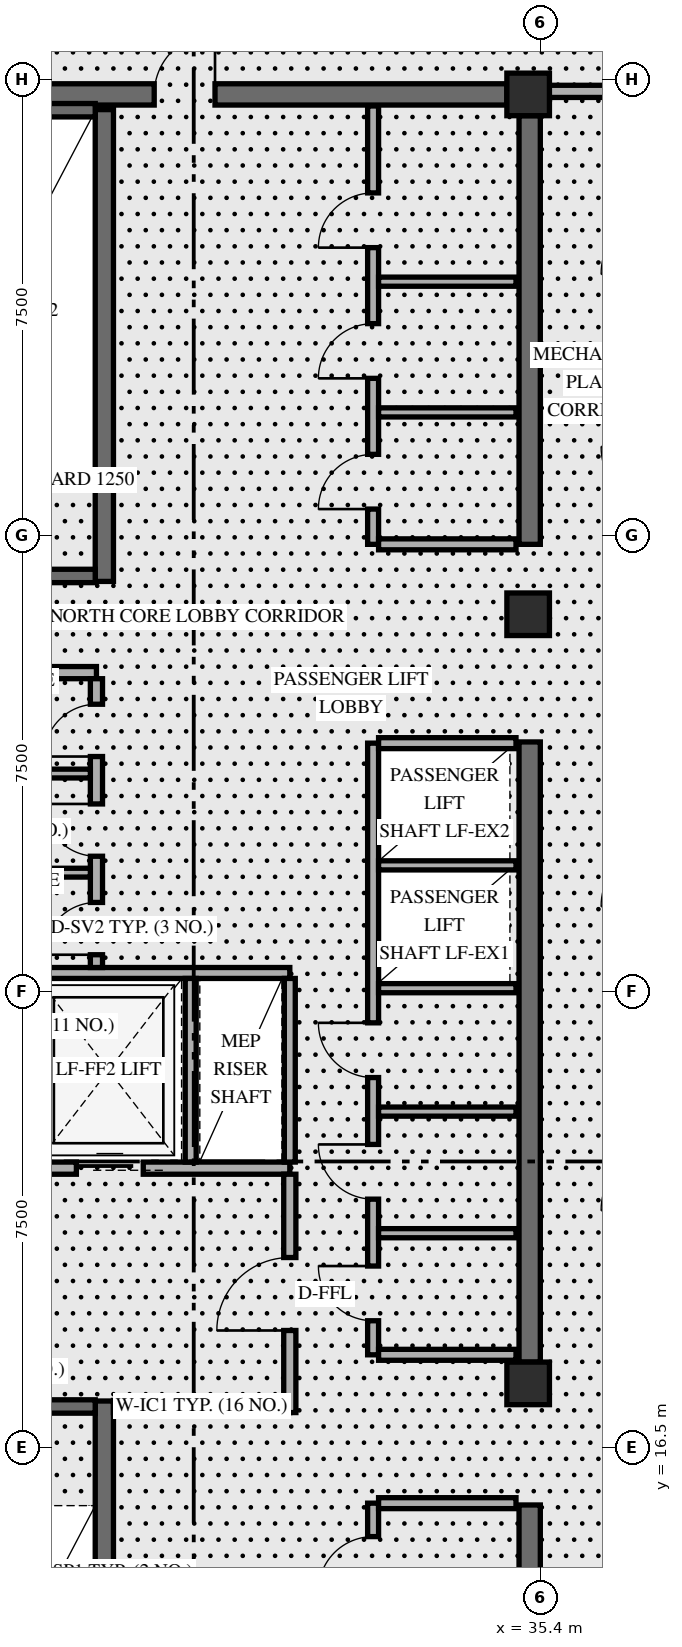
"""IFC4 building model, lengths in metres.
Left out: names, types, materials, properties, quantities, classifications, styles, units other than length and angle.
Written with IfcOpenShell. Run it as: python <this file> out.ifc"""

import sys

from ifc_helpers import new_model, si_unit, direction, frame, frame_2d, origin, origin_2d, place, context, subcontext, project, spatial, rectangle, extrude, element, fill, save


model = new_model("IFC4")
c1 = context("Model", 3, precision=1e-05, world=origin(), true_north=direction((0.0, 1.0)))
c2 = subcontext(c1, "Body", "Model", "MODEL_VIEW")
j1 = project(units=[si_unit("LENGTHUNIT", "METRE"), si_unit("PLANEANGLEUNIT", "RADIAN")], contexts=[c1])
p1 = place(None, origin())
s1 = spatial("IfcSite", under=j1, at=p1, CompositionType="ELEMENT")
p2 = place(p1, origin())
s2 = spatial("IfcBuilding", under=s1, at=p2, CompositionType="ELEMENT")
p3 = place(p2, frame((0.0, 0.0, 287.0)))
s3 = spatial("IfcBuildingStorey", under=s2, at=p3, CompositionType="ELEMENT", Elevation=287.0)
p4 = place(p3, frame((35.225, 9.6, 0.0), z_axis=(0.0, 0.0, 1.0), x_axis=(0.0, 1.0, 0.0)))
e1 = element("IfcWall", 1, at=p4, inside=s3, PredefinedType="SHEAR", context=c2, shape_type="SweptSolid", body=[
    extrude(rectangle(XDim=5.95, YDim=0.35, at=frame_2d((2.975, 0.0))), origin(), (0.0, 0.0, 1.0), 5.161),
])
p5 = place(p3, frame((35.225, 17.9, 0.0), z_axis=(0.0, 0.0, 1.0), x_axis=(0.0, 1.0, 0.0)))
e2 = element("IfcWall", 2, at=p5, inside=s3, PredefinedType="SHEAR", context=c2, shape_type="SweptSolid", body=[
    extrude(rectangle(XDim=10.2, YDim=0.35, at=frame_2d((5.1, 0.0))), origin(), (0.0, 0.0, 1.0), 5.161),
])
p6 = place(p3, frame((35.225, 31.35, 0.0), z_axis=(0.0, 0.0, 1.0), x_axis=(0.0, 1.0, 0.0)))
e3 = element("IfcWall", 3, at=p6, inside=s3, PredefinedType="SHEAR", context=c2, shape_type="SweptSolid", body=[
    extrude(rectangle(XDim=7.05, YDim=0.35, at=frame_2d((3.525, 0.0))), origin(), (0.0, 0.0, 1.0), 5.161),
])
p7 = place(p3, frame((24.55, 38.75, 0.0), z_axis=(0.0, 0.0, 1.0), x_axis=(1.0, 0.0, 0.0)))
e4 = element("IfcWall", 4, at=p7, inside=s3, PredefinedType="SHEAR", context=c2, shape_type="SweptSolid", body=[
    extrude(rectangle(XDim=10.3, YDim=0.35, at=frame_2d((5.15, 0.0))), origin(), (0.0, 0.0, 1.0), 5.7),
])
p8 = place(p7, frame((4.5, 0.0, 0.0)))
e5 = element("IfcOpeningElement", 5, at=p8, cuts=e4, PredefinedType="OPENING", context=c2, shape_type="SweptSolid", body=[
    extrude(rectangle(XDim=1.0, YDim=2.15, at=frame_2d((0.5, 1.075))), frame((0.0, 0.185, 0.0), z_axis=(0.0, -1.0, 0.0), x_axis=(1.0, 0.0, 0.0)), (0.0, 0.0, 1.0), 0.37),
])
p9 = place(p3, frame((28.23, 9.5, 0.0), z_axis=(0.0, 0.0, 1.0), x_axis=(0.0, 1.0, 0.0)))
e6 = element("IfcWall", 6, at=p9, inside=s3, PredefinedType="SHEAR", context=c2, shape_type="SweptSolid", body=[
    extrude(rectangle(XDim=7.76, YDim=0.3, at=frame_2d((3.88, 0.0))), origin(), (0.0, 0.0, 1.0), 5.7),
])
p10 = place(p3, frame((24.92, 17.17, 0.0), z_axis=(0.0, 0.0, 1.0), x_axis=(1.0, 0.0, 0.0)))
e7 = element("IfcWall", 7, at=p10, inside=s3, PredefinedType="SHEAR", context=c2, shape_type="SweptSolid", body=[
    extrude(rectangle(XDim=3.16, YDim=0.22, at=frame_2d((1.58, 0.0))), origin(), (0.0, 0.0, 1.0), 5.7),
])
p11 = place(p10, frame((0.78, 0.0, 0.0)))
e8 = element("IfcOpeningElement", 8, at=p11, cuts=e7, PredefinedType="OPENING", context=c2, shape_type="SweptSolid", body=[
    extrude(rectangle(XDim=1.05, YDim=2.15, at=frame_2d((0.525, 1.075))), frame((0.0, 0.12, 0.0), z_axis=(0.0, -1.0, 0.0), x_axis=(1.0, 0.0, 0.0)), (0.0, 0.0, 1.0), 0.24),
])
p12 = place(p3, frame((28.23, 30.74, 0.0), z_axis=(0.0, 0.0, 1.0), x_axis=(0.0, 1.0, 0.0)))
e9 = element("IfcWall", 9, at=p12, inside=s3, PredefinedType="SHEAR", context=c2, shape_type="SweptSolid", body=[
    extrude(rectangle(XDim=7.76, YDim=0.3, at=frame_2d((3.88, 0.0))), origin(), (0.0, 0.0, 1.0), 5.7),
])
p13 = place(p3, frame((24.92, 30.83, 0.0), z_axis=(0.0, 0.0, 1.0), x_axis=(1.0, 0.0, 0.0)))
e10 = element("IfcWall", 10, at=p13, inside=s3, PredefinedType="SHEAR", context=c2, shape_type="SweptSolid", body=[
    extrude(rectangle(XDim=3.16, YDim=0.22, at=frame_2d((1.58, 0.0))), origin(), (0.0, 0.0, 1.0), 5.7),
])
p14 = place(p13, frame((0.78, 0.0, 0.0)))
e11 = element("IfcOpeningElement", 11, at=p14, cuts=e10, PredefinedType="OPENING", context=c2, shape_type="SweptSolid", body=[
    extrude(rectangle(XDim=1.05, YDim=2.15, at=frame_2d((0.525, 1.075))), frame((0.0, 0.12, 0.0), z_axis=(0.0, -1.0, 0.0), x_axis=(1.0, 0.0, 0.0)), (0.0, 0.0, 1.0), 0.24),
])
p15 = place(p3, frame((24.92, 38.49, 0.0), z_axis=(0.0, 0.0, 1.0), x_axis=(1.0, 0.0, 0.0)))
e12 = element("IfcWall", 12, at=p15, inside=s3, PredefinedType="SHEAR", context=c2, shape_type="SweptSolid", body=[
    extrude(rectangle(XDim=3.16, YDim=0.22, at=frame_2d((1.58, 0.0))), origin(), (0.0, 0.0, 1.0), 5.7),
])
for number, where, z_axis, x_axis in (
    (13, (35.2, 17.55, 0.0), (0.0, 0.0, 1.0), (1.0, 0.0, 0.0)),
    (14, (35.2, 30.2, 0.0), (0.0, 0.0, 1.0), (1.0, 0.0, 0.0)),
    (15, (35.2, 38.75, 0.0), (0.0, 0.0, 1.0), (1.0, 0.0, 0.0)),
):
    element("IfcColumn", number, at=place(p3, frame(where, z_axis=z_axis, x_axis=x_axis)), inside=s3, PredefinedType="COLUMN", context=c2, shape_type="SweptSolid", body=[
        extrude(rectangle(XDim=0.7, YDim=0.7, at=origin_2d()), origin(), (0.0, 0.0, 1.0), 5.996),
    ])
p16 = place(p3, frame((24.45, 21.09, 0.0), z_axis=(0.0, 0.0, 1.0), x_axis=(1.0, 0.0, 0.0)))
e16 = element("IfcWall", 16, at=p16, inside=s3, PredefinedType="STANDARD", context=c2, shape_type="SweptSolid", body=[
    extrude(rectangle(XDim=6.83, YDim=0.2, at=frame_2d((3.415, 0.0))), origin(), (0.0, 0.0, 1.0), 5.7),
])
p17 = place(p16, frame((0.72, 0.0, 0.0)))
e17 = element("IfcOpeningElement", 17, at=p17, cuts=e16, PredefinedType="OPENING", context=c2, shape_type="SweptSolid", body=[
    extrude(rectangle(XDim=1.1, YDim=2.2, at=frame_2d((0.55, 1.1))), frame((0.0, 0.11, 0.0), z_axis=(0.0, -1.0, 0.0), x_axis=(1.0, 0.0, 0.0)), (0.0, 0.0, 1.0), 0.22),
])
p18 = place(p16, frame((3.32, 0.0, 0.0)))
e18 = element("IfcOpeningElement", 18, at=p18, cuts=e16, PredefinedType="OPENING", context=c2, shape_type="SweptSolid", body=[
    extrude(rectangle(XDim=1.1, YDim=2.2, at=frame_2d((0.55, 1.1))), frame((0.0, 0.11, 0.0), z_axis=(0.0, -1.0, 0.0), x_axis=(1.0, 0.0, 0.0)), (0.0, 0.0, 1.0), 0.22),
])
p19 = place(p3, frame((28.38, 17.17, 0.0), z_axis=(0.0, 0.0, 1.0), x_axis=(1.0, 0.0, 0.0)))
e19 = element("IfcWall", 19, at=p19, inside=s3, PredefinedType="STANDARD", context=c2, shape_type="SweptSolid", body=[
    extrude(rectangle(XDim=2.9, YDim=0.2, at=frame_2d((1.45, 0.0))), origin(), (0.0, 0.0, 1.0), 5.7),
])
p20 = place(p3, frame((31.28, 17.07, 0.0), z_axis=(0.0, 0.0, 1.0), x_axis=(0.0, 1.0, 0.0)))
e20 = element("IfcWall", 20, at=p20, inside=s3, PredefinedType="STANDARD", context=c2, shape_type="SweptSolid", body=[
    extrude(rectangle(XDim=3.92, YDim=0.2, at=frame_2d((1.96, 0.0))), origin(), (0.0, 0.0, 1.0), 5.143),
])
p21 = place(p20, frame((1.35, 0.0, 0.0)))
e21 = element("IfcOpeningElement", 21, at=p21, cuts=e20, PredefinedType="OPENING", context=c2, shape_type="SweptSolid", body=[
    extrude(rectangle(XDim=1.2, YDim=2.15, at=frame_2d((0.6, 1.075))), frame((0.0, 0.11, 0.0), z_axis=(0.0, -1.0, 0.0), x_axis=(1.0, 0.0, 0.0)), (0.0, 0.0, 1.0), 0.22),
])
p22 = place(p3, frame((24.45, 24.3, 0.0), z_axis=(0.0, 0.0, 1.0), x_axis=(1.0, 0.0, 0.0)))
e22 = element("IfcWall", 22, at=p22, inside=s3, PredefinedType="STANDARD", context=c2, shape_type="SweptSolid", body=[
    extrude(rectangle(XDim=6.83, YDim=0.18, at=frame_2d((3.415, 0.0))), origin(), (0.0, 0.0, 1.0), 5.7),
])
for number, where, z_axis, x_axis in (
    (23, (29.65, 21.19, 0.0), (0.0, 0.0, 1.0), (0.0, 1.0, 0.0)),
    (24, (31.28, 21.19, 0.0), (0.0, 0.0, 1.0), (0.0, 1.0, 0.0)),
):
    element("IfcWall", number, at=place(p3, frame(where, z_axis=z_axis, x_axis=x_axis)), inside=s3, PredefinedType="STANDARD", context=c2, shape_type="SweptSolid", body=[
        extrude(rectangle(XDim=3.02, YDim=0.18, at=frame_2d((1.51, 0.0))), origin(), (0.0, 0.0, 1.0), 5.7),
    ])
p23 = place(p3, frame((24.45, 29.24, 0.0), z_axis=(0.0, 0.0, 1.0), x_axis=(1.0, 0.0, 0.0)))
e25 = element("IfcWall", 25, at=p23, inside=s3, PredefinedType="STANDARD", context=c2, shape_type="SweptSolid", body=[
    extrude(rectangle(XDim=3.65, YDim=0.2, at=frame_2d((1.825, 0.0))), origin(), (0.0, 0.0, 1.0), 5.7),
])
p24 = place(p3, frame((28.1, 24.39, 0.0), z_axis=(0.0, 0.0, 1.0), x_axis=(0.0, 1.0, 0.0)))
e26 = element("IfcWall", 26, at=p24, inside=s3, PredefinedType="STANDARD", context=c2, shape_type="SweptSolid", body=[
    extrude(rectangle(XDim=4.75, YDim=0.2, at=frame_2d((2.375, 0.0))), origin(), (0.0, 0.0, 1.0), 5.7),
])
p25 = place(p24, frame((0.21, 0.0, 0.0)))
e27 = element("IfcOpeningElement", 27, at=p25, cuts=e26, PredefinedType="OPENING", context=c2, shape_type="SweptSolid", body=[
    extrude(rectangle(XDim=0.86, YDim=2.1, at=frame_2d((0.43, 1.05))), frame((0.0, 0.11, 0.0), z_axis=(0.0, -1.0, 0.0), x_axis=(1.0, 0.0, 0.0)), (0.0, 0.0, 1.0), 0.22),
])
p26 = place(p24, frame((1.83, 0.0, 0.0)))
e28 = element("IfcOpeningElement", 28, at=p26, cuts=e26, PredefinedType="OPENING", context=c2, shape_type="SweptSolid", body=[
    extrude(rectangle(XDim=0.86, YDim=2.1, at=frame_2d((0.43, 1.05))), frame((0.0, 0.11, 0.0), z_axis=(0.0, -1.0, 0.0), x_axis=(1.0, 0.0, 0.0)), (0.0, 0.0, 1.0), 0.22),
])
p27 = place(p24, frame((3.47, 0.0, 0.0)))
e29 = element("IfcOpeningElement", 29, at=p27, cuts=e26, PredefinedType="OPENING", context=c2, shape_type="SweptSolid", body=[
    extrude(rectangle(XDim=0.86, YDim=2.1, at=frame_2d((0.43, 1.05))), frame((0.0, 0.11, 0.0), z_axis=(0.0, -1.0, 0.0), x_axis=(1.0, 0.0, 0.0)), (0.0, 0.0, 1.0), 0.22),
])
for number, where, z_axis, x_axis in (
    (30, (24.45, 25.95, 0.0), (0.0, 0.0, 1.0), (1.0, 0.0, 0.0)),
    (31, (24.45, 27.58, 0.0), (0.0, 0.0, 1.0), (1.0, 0.0, 0.0)),
):
    element("IfcWall", number, at=place(p3, frame(where, z_axis=z_axis, x_axis=x_axis)), inside=s3, PredefinedType="PARTITIONING", context=c2, shape_type="SweptSolid", body=[
        extrude(rectangle(XDim=3.55, YDim=0.145, at=frame_2d((1.775, 0.0))), origin(), (0.0, 0.0, 1.0), 5.7),
    ])
p28 = place(p3, frame((32.65, 9.5, 0.0), z_axis=(0.0, 0.0, 1.0), x_axis=(0.0, 1.0, 0.0)))
e32 = element("IfcWall", 32, at=p28, inside=s3, PredefinedType="STANDARD", context=c2, shape_type="SweptSolid", body=[
    extrude(rectangle(XDim=6.08, YDim=0.18, at=frame_2d((3.04, 0.0))), origin(), (0.0, 0.0, 1.0), 5.7),
])
p29 = place(p28, frame((0.63, 0.0, 0.0)))
e33 = element("IfcOpeningElement", 33, at=p29, cuts=e32, PredefinedType="OPENING", context=c2, shape_type="SweptSolid", body=[
    extrude(rectangle(XDim=0.9, YDim=2.1, at=frame_2d((0.45, 1.05))), frame((0.0, 0.1, 0.0), z_axis=(0.0, -1.0, 0.0), x_axis=(1.0, 0.0, 0.0)), (0.0, 0.0, 1.0), 0.2),
])
p30 = place(p28, frame((2.63, 0.0, 0.0)))
e34 = element("IfcOpeningElement", 34, at=p30, cuts=e32, PredefinedType="OPENING", context=c2, shape_type="SweptSolid", body=[
    extrude(rectangle(XDim=0.9, YDim=2.1, at=frame_2d((0.45, 1.05))), frame((0.0, 0.1, 0.0), z_axis=(0.0, -1.0, 0.0), x_axis=(1.0, 0.0, 0.0)), (0.0, 0.0, 1.0), 0.2),
])
p31 = place(p28, frame((4.63, 0.0, 0.0)))
e35 = element("IfcOpeningElement", 35, at=p31, cuts=e32, PredefinedType="OPENING", context=c2, shape_type="SweptSolid", body=[
    extrude(rectangle(XDim=0.9, YDim=2.1, at=frame_2d((0.45, 1.05))), frame((0.0, 0.1, 0.0), z_axis=(0.0, -1.0, 0.0), x_axis=(1.0, 0.0, 0.0)), (0.0, 0.0, 1.0), 0.2),
])
p32 = place(p3, frame((32.74, 15.58, 0.0), z_axis=(0.0, 0.0, 1.0), x_axis=(1.0, 0.0, 0.0)))
e36 = element("IfcWall", 36, at=p32, inside=s3, PredefinedType="STANDARD", context=c2, shape_type="SweptSolid", body=[
    extrude(rectangle(XDim=2.26, YDim=0.18, at=frame_2d((1.13, 0.0))), origin(), (0.0, 0.0, 1.0), 5.7),
])
p33 = place(p3, frame((32.65, 18.02, 0.0), z_axis=(0.0, 0.0, 1.0), x_axis=(0.0, 1.0, 0.0)))
e37 = element("IfcWall", 37, at=p33, inside=s3, PredefinedType="STANDARD", context=c2, shape_type="SweptSolid", body=[
    extrude(rectangle(XDim=10.06, YDim=0.18, at=frame_2d((5.03, 0.0))), origin(), (0.0, 0.0, 1.0), 5.7),
])
p34 = place(p33, frame((0.56, 0.0, 0.0)))
e38 = element("IfcOpeningElement", 38, at=p34, cuts=e37, PredefinedType="OPENING", context=c2, shape_type="SweptSolid", body=[
    extrude(rectangle(XDim=0.9, YDim=2.1, at=frame_2d((0.45, 1.05))), frame((0.0, 0.1, 0.0), z_axis=(0.0, -1.0, 0.0), x_axis=(1.0, 0.0, 0.0)), (0.0, 0.0, 1.0), 0.2),
])
p35 = place(p33, frame((2.56, 0.0, 0.0)))
e39 = element("IfcOpeningElement", 39, at=p35, cuts=e37, PredefinedType="OPENING", context=c2, shape_type="SweptSolid", body=[
    extrude(rectangle(XDim=0.9, YDim=2.1, at=frame_2d((0.45, 1.05))), frame((0.0, 0.1, 0.0), z_axis=(0.0, -1.0, 0.0), x_axis=(1.0, 0.0, 0.0)), (0.0, 0.0, 1.0), 0.2),
])
p36 = place(p33, frame((4.56, 0.0, 0.0)))
e40 = element("IfcOpeningElement", 40, at=p36, cuts=e37, PredefinedType="OPENING", context=c2, shape_type="SweptSolid", body=[
    extrude(rectangle(XDim=0.9, YDim=2.1, at=frame_2d((0.45, 1.05))), frame((0.0, 0.1, 0.0), z_axis=(0.0, -1.0, 0.0), x_axis=(1.0, 0.0, 0.0)), (0.0, 0.0, 1.0), 0.2),
])
for number, where, z_axis, x_axis in (
    (41, (32.74, 18.02, 0.0), (0.0, 0.0, 1.0), (1.0, 0.0, 0.0)),
    (42, (32.74, 28.08, 0.0), (0.0, 0.0, 1.0), (1.0, 0.0, 0.0)),
):
    element("IfcWall", number, at=place(p3, frame(where, z_axis=z_axis, x_axis=x_axis)), inside=s3, PredefinedType="STANDARD", context=c2, shape_type="SweptSolid", body=[
        extrude(rectangle(XDim=2.26, YDim=0.18, at=frame_2d((1.13, 0.0))), origin(), (0.0, 0.0, 1.0), 5.7),
    ])
for number, where, z_axis, x_axis in (
    (43, (32.74, 20.02, 0.0), (0.0, 0.0, 1.0), (1.0, 0.0, 0.0)),
    (44, (32.74, 22.02, 0.0), (0.0, 0.0, 1.0), (1.0, 0.0, 0.0)),
    (45, (32.74, 24.05, 0.0), (0.0, 0.0, 1.0), (1.0, 0.0, 0.0)),
    (46, (32.74, 26.07, 0.0), (0.0, 0.0, 1.0), (1.0, 0.0, 0.0)),
):
    element("IfcWall", number, at=place(p3, frame(where, z_axis=z_axis, x_axis=x_axis)), inside=s3, PredefinedType="STANDARD", context=c2, shape_type="SweptSolid", body=[
        extrude(rectangle(XDim=2.26, YDim=0.15, at=frame_2d((1.13, 0.0))), origin(), (0.0, 0.0, 1.0), 5.7),
    ])
p37 = place(p3, frame((32.65, 31.35, 0.0), z_axis=(0.0, 0.0, 1.0), x_axis=(0.0, 1.0, 0.0)))
e47 = element("IfcWall", 47, at=p37, inside=s3, PredefinedType="STANDARD", context=c2, shape_type="SweptSolid", body=[
    extrude(rectangle(XDim=7.21, YDim=0.18, at=frame_2d((3.605, 0.0))), origin(), (0.0, 0.0, 1.0), 5.7),
])
p38 = place(p37, frame((0.58, 0.0, 0.0)))
e48 = element("IfcOpeningElement", 48, at=p38, cuts=e47, PredefinedType="OPENING", context=c2, shape_type="SweptSolid", body=[
    extrude(rectangle(XDim=0.9, YDim=2.1, at=frame_2d((0.45, 1.05))), frame((0.0, 0.1, 0.0), z_axis=(0.0, -1.0, 0.0), x_axis=(1.0, 0.0, 0.0)), (0.0, 0.0, 1.0), 0.2),
])
p39 = place(p37, frame((2.73, 0.0, 0.0)))
e49 = element("IfcOpeningElement", 49, at=p39, cuts=e47, PredefinedType="OPENING", context=c2, shape_type="SweptSolid", body=[
    extrude(rectangle(XDim=0.9, YDim=2.1, at=frame_2d((0.45, 1.05))), frame((0.0, 0.1, 0.0), z_axis=(0.0, -1.0, 0.0), x_axis=(1.0, 0.0, 0.0)), (0.0, 0.0, 1.0), 0.2),
])
p40 = place(p37, frame((4.88, 0.0, 0.0)))
e50 = element("IfcOpeningElement", 50, at=p40, cuts=e47, PredefinedType="OPENING", context=c2, shape_type="SweptSolid", body=[
    extrude(rectangle(XDim=0.9, YDim=2.1, at=frame_2d((0.45, 1.05))), frame((0.0, 0.1, 0.0), z_axis=(0.0, -1.0, 0.0), x_axis=(1.0, 0.0, 0.0)), (0.0, 0.0, 1.0), 0.2),
])
p41 = place(p3, frame((32.74, 31.35, 0.0), z_axis=(0.0, 0.0, 1.0), x_axis=(1.0, 0.0, 0.0)))
e51 = element("IfcWall", 51, at=p41, inside=s3, PredefinedType="STANDARD", context=c2, shape_type="SweptSolid", body=[
    extrude(rectangle(XDim=2.26, YDim=0.18, at=frame_2d((1.13, 0.0))), origin(), (0.0, 0.0, 1.0), 5.7),
])
for number, where, z_axis, x_axis in (
    (52, (32.74, 33.52, 0.0), (0.0, 0.0, 1.0), (1.0, 0.0, 0.0)),
    (53, (32.74, 35.67, 0.0), (0.0, 0.0, 1.0), (1.0, 0.0, 0.0)),
):
    element("IfcWall", number, at=place(p3, frame(where, z_axis=z_axis, x_axis=x_axis)), inside=s3, PredefinedType="STANDARD", context=c2, shape_type="SweptSolid", body=[
        extrude(rectangle(XDim=2.26, YDim=0.15, at=frame_2d((1.13, 0.0))), origin(), (0.0, 0.0, 1.0), 5.7),
    ])
p42 = place(p3, frame((35.42, 38.8, 0.0), z_axis=(0.0, 0.0, 1.0), x_axis=(1.0, 0.0, 0.0)))
e54 = element("IfcWall", 54, at=p42, inside=s3, PredefinedType="STANDARD", context=c2, shape_type="SweptSolid", body=[
    extrude(rectangle(XDim=1.93, YDim=0.2, at=frame_2d((0.965, 0.0))), origin(), (0.0, 0.0, 1.0), 5.143),
])
p43 = place(p18, origin())
e55 = element("IfcDoor", 55, at=p43, inside=s3, OperationType="SLIDING_TO_LEFT", PredefinedType="DOOR", context=c2, shape_type="SweptSolid", body=[
    extrude(rectangle(XDim=1.1, YDim=2.2, at=frame_2d((0.55, 1.1))), frame((0.0, 0.025, 0.0), z_axis=(0.0, -1.0, 0.0), x_axis=(1.0, 0.0, 0.0)), (0.0, 0.0, 1.0), 0.05),
])
fill(e18, e55)
p44 = place(p21, origin())
e56 = element("IfcDoor", 56, at=p44, inside=s3, OperationType="SINGLE_SWING_LEFT", PredefinedType="DOOR", context=c2, shape_type="SweptSolid", body=[
    extrude(rectangle(XDim=1.2, YDim=2.15, at=frame_2d((0.6, 1.075))), frame((0.0, 0.025, 0.0), z_axis=(0.0, -1.0, 0.0), x_axis=(1.0, 0.0, 0.0)), (0.0, 0.0, 1.0), 0.05),
])
fill(e21, e56)
p45 = place(p25, origin())
e57 = element("IfcDoor", 57, at=p45, inside=s3, OperationType="SINGLE_SWING_LEFT", PredefinedType="DOOR", context=c2, shape_type="SweptSolid", body=[
    extrude(rectangle(XDim=0.86, YDim=2.1, at=frame_2d((0.43, 1.05))), frame((0.0, 0.025, 0.0), z_axis=(0.0, -1.0, 0.0), x_axis=(1.0, 0.0, 0.0)), (0.0, 0.0, 1.0), 0.05),
])
fill(e27, e57)
p46 = place(p26, origin())
e58 = element("IfcDoor", 58, at=p46, inside=s3, OperationType="SINGLE_SWING_RIGHT", PredefinedType="DOOR", context=c2, shape_type="SweptSolid", body=[
    extrude(rectangle(XDim=0.86, YDim=2.1, at=frame_2d((0.43, 1.05))), frame((0.0, 0.025, 0.0), z_axis=(0.0, -1.0, 0.0), x_axis=(1.0, 0.0, 0.0)), (0.0, 0.0, 1.0), 0.05),
])
fill(e28, e58)
p47 = place(p27, origin())
e59 = element("IfcDoor", 59, at=p47, inside=s3, OperationType="SINGLE_SWING_LEFT", PredefinedType="DOOR", context=c2, shape_type="SweptSolid", body=[
    extrude(rectangle(XDim=0.86, YDim=2.1, at=frame_2d((0.43, 1.05))), frame((0.0, 0.025, 0.0), z_axis=(0.0, -1.0, 0.0), x_axis=(1.0, 0.0, 0.0)), (0.0, 0.0, 1.0), 0.05),
])
fill(e29, e59)
p48 = place(p31, origin())
e60 = element("IfcDoor", 60, at=p48, inside=s3, OperationType="SINGLE_SWING_LEFT", PredefinedType="DOOR", context=c2, shape_type="SweptSolid", body=[
    extrude(rectangle(XDim=0.9, YDim=2.1, at=frame_2d((0.45, 1.05))), frame((0.0, 0.025, 0.0), z_axis=(0.0, -1.0, 0.0), x_axis=(1.0, 0.0, 0.0)), (0.0, 0.0, 1.0), 0.05),
])
fill(e35, e60)
p49 = place(p34, origin())
e61 = element("IfcDoor", 61, at=p49, inside=s3, OperationType="SINGLE_SWING_RIGHT", PredefinedType="DOOR", context=c2, shape_type="SweptSolid", body=[
    extrude(rectangle(XDim=0.9, YDim=2.1, at=frame_2d((0.45, 1.05))), frame((0.0, 0.025, 0.0), z_axis=(0.0, -1.0, 0.0), x_axis=(1.0, 0.0, 0.0)), (0.0, 0.0, 1.0), 0.05),
])
fill(e38, e61)
p50 = place(p35, origin())
e62 = element("IfcDoor", 62, at=p50, inside=s3, OperationType="SINGLE_SWING_RIGHT", PredefinedType="DOOR", context=c2, shape_type="SweptSolid", body=[
    extrude(rectangle(XDim=0.9, YDim=2.1, at=frame_2d((0.45, 1.05))), frame((0.0, 0.025, 0.0), z_axis=(0.0, -1.0, 0.0), x_axis=(1.0, 0.0, 0.0)), (0.0, 0.0, 1.0), 0.05),
])
fill(e39, e62)
p51 = place(p36, origin())
e63 = element("IfcDoor", 63, at=p51, inside=s3, OperationType="SINGLE_SWING_RIGHT", PredefinedType="DOOR", context=c2, shape_type="SweptSolid", body=[
    extrude(rectangle(XDim=0.9, YDim=2.1, at=frame_2d((0.45, 1.05))), frame((0.0, 0.025, 0.0), z_axis=(0.0, -1.0, 0.0), x_axis=(1.0, 0.0, 0.0)), (0.0, 0.0, 1.0), 0.05),
])
fill(e40, e63)
p52 = place(p38, origin())
e64 = element("IfcDoor", 64, at=p52, inside=s3, OperationType="SINGLE_SWING_LEFT", PredefinedType="DOOR", context=c2, shape_type="SweptSolid", body=[
    extrude(rectangle(XDim=0.9, YDim=2.1, at=frame_2d((0.45, 1.05))), frame((0.0, 0.025, 0.0), z_axis=(0.0, -1.0, 0.0), x_axis=(1.0, 0.0, 0.0)), (0.0, 0.0, 1.0), 0.05),
])
fill(e48, e64)
p53 = place(p39, origin())
e65 = element("IfcDoor", 65, at=p53, inside=s3, OperationType="SINGLE_SWING_LEFT", PredefinedType="DOOR", context=c2, shape_type="SweptSolid", body=[
    extrude(rectangle(XDim=0.9, YDim=2.1, at=frame_2d((0.45, 1.05))), frame((0.0, 0.025, 0.0), z_axis=(0.0, -1.0, 0.0), x_axis=(1.0, 0.0, 0.0)), (0.0, 0.0, 1.0), 0.05),
])
fill(e49, e65)
p54 = place(p40, origin())
e66 = element("IfcDoor", 66, at=p54, inside=s3, OperationType="SINGLE_SWING_LEFT", PredefinedType="DOOR", context=c2, shape_type="SweptSolid", body=[
    extrude(rectangle(XDim=0.9, YDim=2.1, at=frame_2d((0.45, 1.05))), frame((0.0, 0.025, 0.0), z_axis=(0.0, -1.0, 0.0), x_axis=(1.0, 0.0, 0.0)), (0.0, 0.0, 1.0), 0.05),
])
fill(e50, e66)
p55 = place(p8, origin())
e67 = element("IfcDoor", 67, at=p55, inside=s3, OperationType="SINGLE_SWING_RIGHT", PredefinedType="DOOR", context=c2, shape_type="SweptSolid", body=[
    extrude(rectangle(XDim=1.0, YDim=2.15, at=frame_2d((0.5, 1.075))), frame((0.0, 0.025, 0.0), z_axis=(0.0, -1.0, 0.0), x_axis=(1.0, 0.0, 0.0)), (0.0, 0.0, 1.0), 0.05),
])
fill(e5, e67)
save(model, sys.argv[1])
